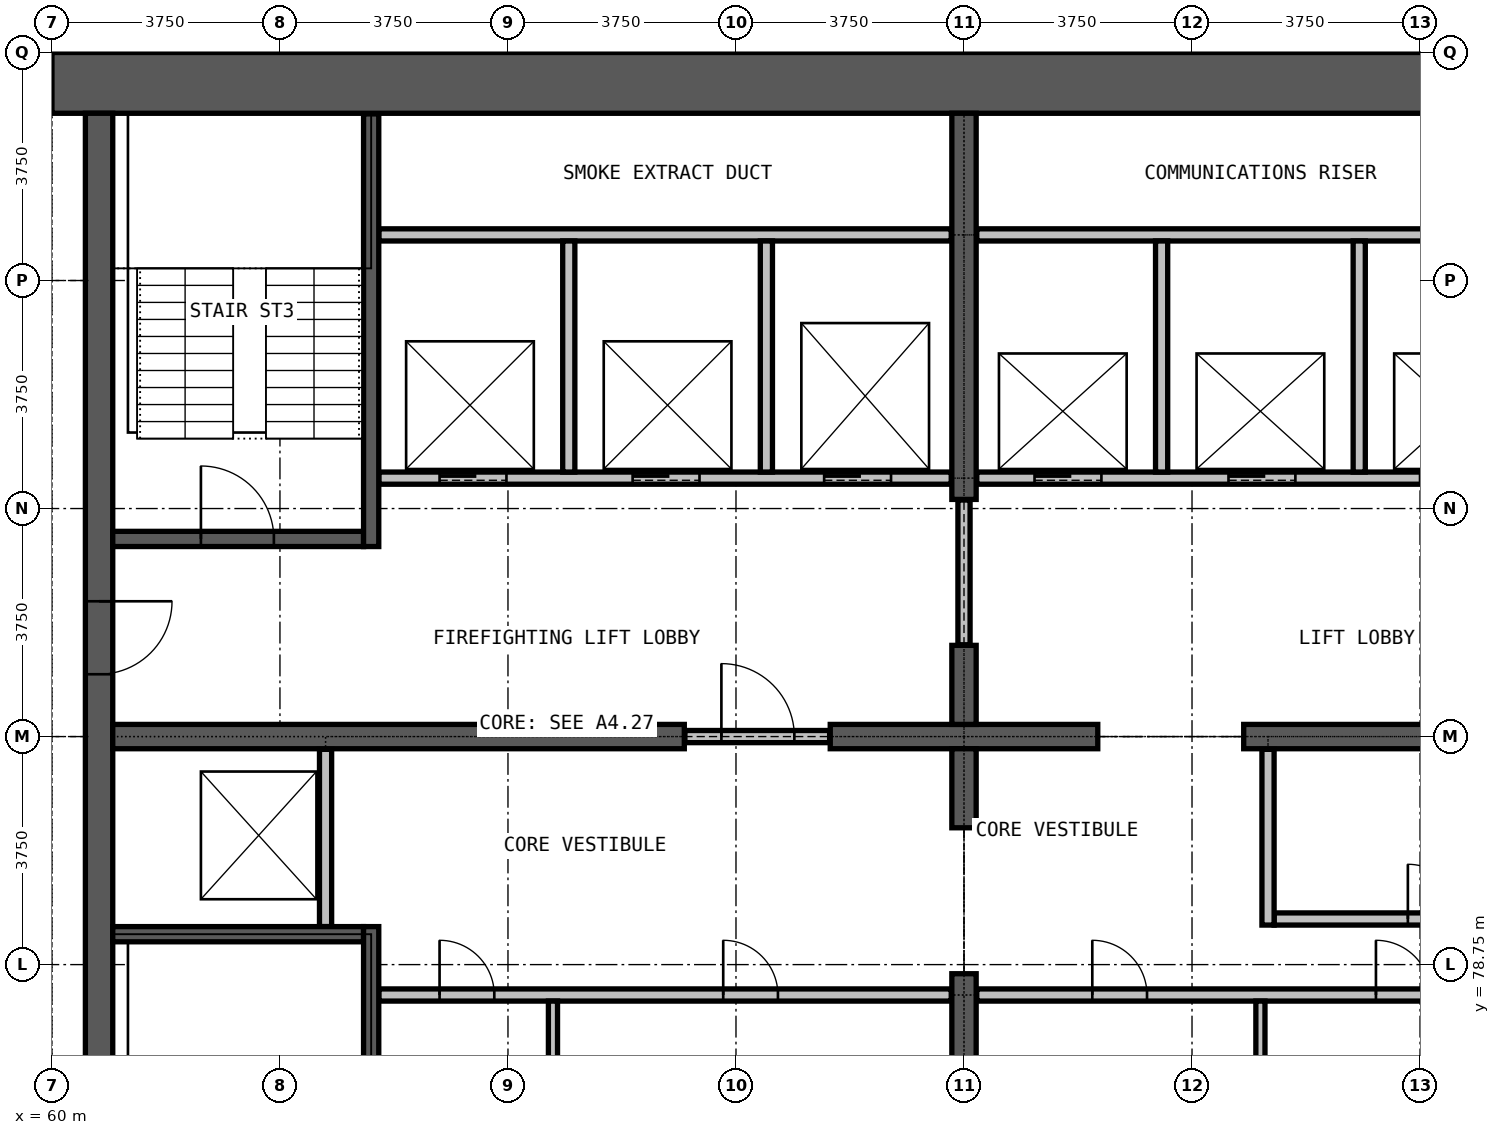
"""IFC4 building model, lengths in metres.
Left out: names, types, materials, properties, quantities, classifications, styles, units other than length and angle.
Written with IfcOpenShell. Run it as: python <this file> out.ifc"""

import sys

from ifc_helpers import new_model, si_unit, direction, frame, frame_2d, origin, place, context, subcontext, project, spatial, rectangle, extrude, element, fill, save


model = new_model("IFC4")
c1 = context("Model", 3, precision=1e-05, world=origin(), true_north=direction((0.0, 1.0)))
c2 = subcontext(c1, "Body", "Model", "MODEL_VIEW")
j1 = project(units=[si_unit("LENGTHUNIT", "METRE"), si_unit("PLANEANGLEUNIT", "RADIAN")], contexts=[c1])
p1 = place(None, origin())
s1 = spatial("IfcSite", under=j1, at=p1, CompositionType="ELEMENT")
p2 = place(p1, origin())
s2 = spatial("IfcBuilding", under=s1, at=p2, CompositionType="ELEMENT")
p3 = place(p2, frame((0.0, 0.0, 265.7)))
s3 = spatial("IfcBuildingStorey", under=s2, at=p3, CompositionType="ELEMENT", Elevation=265.7)
p4 = place(p3, frame((90.0, 93.25, 0.0), z_axis=(0.0, 0.0, 1.0), x_axis=(-1.0, 0.0, 0.0)))
e1 = element("IfcWall", 1, at=p4, inside=s3, PredefinedType="SHEAR", context=c2, shape_type="SweptSolid", body=[
    extrude(rectangle(XDim=30.0, YDim=1.0, at=frame_2d((15.0, 0.0))), origin(), (0.0, 0.0, 1.0), 3.6),
])
p5 = place(p3, frame((60.775, 92.75, 0.0), z_axis=(0.0, 0.0, 1.0), x_axis=(0.0, -1.0, 0.0)))
e2 = element("IfcWall", 2, at=p5, inside=s3, PredefinedType="SHEAR", context=c2, shape_type="SweptSolid", body=[
    extrude(rectangle(XDim=20.5, YDim=0.45, at=frame_2d((10.25, 0.0))), origin(), (0.0, 0.0, 1.0), 3.6),
])
p6 = place(p5, frame((19.025, 0.0, 0.0)))
e3 = element("IfcOpeningElement", 3, at=p6, cuts=e2, PredefinedType="OPENING", context=c2, shape_type="SweptSolid", body=[
    extrude(rectangle(XDim=1.2, YDim=2.2, at=frame_2d((0.6, 1.1))), frame((0.0, 0.235, 0.0), z_axis=(0.0, -1.0, 0.0), x_axis=(1.0, 0.0, 0.0)), (0.0, 0.0, 1.0), 0.47),
])
p7 = place(p5, frame((8.025, 0.0, 0.0)))
e4 = element("IfcOpeningElement", 4, at=p7, cuts=e2, PredefinedType="OPENING", context=c2, shape_type="SweptSolid", body=[
    extrude(rectangle(XDim=1.2, YDim=2.2, at=frame_2d((0.6, 1.1))), frame((0.0, 0.235, 0.0), z_axis=(0.0, -1.0, 0.0), x_axis=(1.0, 0.0, 0.0)), (0.0, 0.0, 1.0), 0.47),
])
p8 = place(p3, frame((61.0, 82.5, 0.0), z_axis=(0.0, 0.0, 1.0), x_axis=(1.0, 0.0, 0.0)))
e5 = element("IfcWall", 5, at=p8, inside=s3, PredefinedType="SHEAR", context=c2, shape_type="SweptSolid", body=[
    extrude(rectangle(XDim=9.4, YDim=0.4, at=frame_2d((4.7, 0.0))), origin(), (0.0, 0.0, 1.0), 3.6),
])
p9 = place(p3, frame((72.8, 82.5, 0.0), z_axis=(0.0, 0.0, 1.0), x_axis=(1.0, 0.0, 0.0)))
e6 = element("IfcWall", 6, at=p9, inside=s3, PredefinedType="SHEAR", context=c2, shape_type="SweptSolid", body=[
    extrude(rectangle(XDim=4.4, YDim=0.4, at=frame_2d((2.2, 0.0))), origin(), (0.0, 0.0, 1.0), 3.6),
])
p10 = place(p3, frame((79.6, 82.5, 0.0), z_axis=(0.0, 0.0, 1.0), x_axis=(1.0, 0.0, 0.0)))
e7 = element("IfcWall", 7, at=p10, inside=s3, PredefinedType="SHEAR", context=c2, shape_type="SweptSolid", body=[
    extrude(rectangle(XDim=9.4, YDim=0.4, at=frame_2d((4.7, 0.0))), origin(), (0.0, 0.0, 1.0), 3.6),
])
p11 = place(p3, frame((75.0, 72.25, 0.0), z_axis=(0.0, 0.0, 1.0), x_axis=(0.0, 1.0, 0.0)))
e8 = element("IfcWall", 8, at=p11, inside=s3, PredefinedType="SHEAR", context=c2, shape_type="SweptSolid", body=[
    extrude(rectangle(XDim=6.35, YDim=0.4, at=frame_2d((3.175, 0.0))), origin(), (0.0, 0.0, 1.0), 3.6),
])
for number, where, z_axis, x_axis in (
    (9, (75.0, 81.0, 0.0), (0.0, 0.0, 1.0), (0.0, 1.0, 0.0)),
    (10, (75.0, 82.7, 0.0), (0.0, 0.0, 1.0), (0.0, 1.0, 0.0)),
):
    element("IfcWall", number, at=place(p3, frame(where, z_axis=z_axis, x_axis=x_axis)), inside=s3, PredefinedType="SHEAR", context=c2, shape_type="SweptSolid", body=[
        extrude(rectangle(XDim=1.3, YDim=0.4, at=frame_2d((0.65, 0.0))), origin(), (0.0, 0.0, 1.0), 3.6),
    ])
p12 = place(p3, frame((75.0, 86.4, 0.0), z_axis=(0.0, 0.0, 1.0), x_axis=(0.0, 1.0, 0.0)))
e11 = element("IfcWall", 11, at=p12, inside=s3, PredefinedType="SHEAR", context=c2, shape_type="SweptSolid", body=[
    extrude(rectangle(XDim=6.35, YDim=0.4, at=frame_2d((3.175, 0.0))), origin(), (0.0, 0.0, 1.0), 3.6),
])
p13 = place(p3, frame((65.375, 78.25, 0.0), z_axis=(0.0, 0.0, 1.0), x_axis=(1.0, 0.0, 0.0)))
e12 = element("IfcWall", 12, at=p13, inside=s3, PredefinedType="PARTITIONING", context=c2, shape_type="SweptSolid", body=[
    extrude(rectangle(XDim=9.415, YDim=0.2, at=frame_2d((4.708, 0.0))), origin(), (0.0, 0.0, 1.0), 3.3),
])
p14 = place(p13, frame((1.0, 0.0, 0.0)))
e13 = element("IfcOpeningElement", 13, at=p14, cuts=e12, PredefinedType="OPENING", context=c2, shape_type="SweptSolid", body=[
    extrude(rectangle(XDim=0.9, YDim=2.2, at=frame_2d((0.45, 1.1))), frame((0.0, 0.11, 0.0), z_axis=(0.0, -1.0, 0.0), x_axis=(1.0, 0.0, 0.0)), (0.0, 0.0, 1.0), 0.22),
])
p15 = place(p13, frame((5.665, 0.0, 0.0)))
e14 = element("IfcOpeningElement", 14, at=p15, cuts=e12, PredefinedType="OPENING", context=c2, shape_type="SweptSolid", body=[
    extrude(rectangle(XDim=0.9, YDim=2.2, at=frame_2d((0.45, 1.1))), frame((0.0, 0.11, 0.0), z_axis=(0.0, -1.0, 0.0), x_axis=(1.0, 0.0, 0.0)), (0.0, 0.0, 1.0), 0.22),
])
p16 = place(p3, frame((75.21, 78.25, 0.0), z_axis=(0.0, 0.0, 1.0), x_axis=(1.0, 0.0, 0.0)))
e15 = element("IfcWall", 15, at=p16, inside=s3, PredefinedType="PARTITIONING", context=c2, shape_type="SweptSolid", body=[
    extrude(rectangle(XDim=9.415, YDim=0.2, at=frame_2d((4.708, 0.0))), origin(), (0.0, 0.0, 1.0), 3.3),
])
p17 = place(p16, frame((1.9, 0.0, 0.0)))
e16 = element("IfcOpeningElement", 16, at=p17, cuts=e15, PredefinedType="OPENING", context=c2, shape_type="SweptSolid", body=[
    extrude(rectangle(XDim=0.9, YDim=2.2, at=frame_2d((0.45, 1.1))), frame((0.0, 0.11, 0.0), z_axis=(0.0, -1.0, 0.0), x_axis=(1.0, 0.0, 0.0)), (0.0, 0.0, 1.0), 0.22),
])
p18 = place(p16, frame((6.565, 0.0, 0.0)))
e17 = element("IfcOpeningElement", 17, at=p18, cuts=e15, PredefinedType="OPENING", context=c2, shape_type="SweptSolid", body=[
    extrude(rectangle(XDim=0.9, YDim=2.2, at=frame_2d((0.45, 1.1))), frame((0.0, 0.11, 0.0), z_axis=(0.0, -1.0, 0.0), x_axis=(1.0, 0.0, 0.0)), (0.0, 0.0, 1.0), 0.22),
])
p19 = place(p3, frame((80.1, 79.5, 0.0), z_axis=(0.0, 0.0, 1.0), x_axis=(1.0, 0.0, 0.0)))
e18 = element("IfcWall", 18, at=p19, inside=s3, PredefinedType="PARTITIONING", context=c2, shape_type="SweptSolid", body=[
    extrude(rectangle(XDim=5.3, YDim=0.2, at=frame_2d((2.65, 0.0))), origin(), (0.0, 0.0, 1.0), 3.3),
])
p20 = place(p19, frame((2.2, 0.0, 0.0)))
e19 = element("IfcOpeningElement", 19, at=p20, cuts=e18, PredefinedType="OPENING", context=c2, shape_type="SweptSolid", body=[
    extrude(rectangle(XDim=0.9, YDim=2.2, at=frame_2d((0.45, 1.1))), frame((0.0, 0.11, 0.0), z_axis=(0.0, -1.0, 0.0), x_axis=(1.0, 0.0, 0.0)), (0.0, 0.0, 1.0), 0.22),
])
p21 = place(p3, frame((70.41, 82.5, 0.0), z_axis=(0.0, 0.0, 1.0), x_axis=(1.0, 0.0, 0.0)))
e20 = element("IfcWall", 20, at=p21, inside=s3, PredefinedType="PARTITIONING", context=c2, shape_type="SweptSolid", body=[
    extrude(rectangle(XDim=2.38, YDim=0.2, at=frame_2d((1.19, 0.0))), origin(), (0.0, 0.0, 1.0), 2.4),
])
p22 = place(p21, frame((0.6, 0.0, 0.0)))
e21 = element("IfcOpeningElement", 21, at=p22, cuts=e20, PredefinedType="OPENING", context=c2, shape_type="SweptSolid", body=[
    extrude(rectangle(XDim=1.2, YDim=2.2, at=frame_2d((0.6, 1.1))), frame((0.0, 0.11, 0.0), z_axis=(0.0, -1.0, 0.0), x_axis=(1.0, 0.0, 0.0)), (0.0, 0.0, 1.0), 0.22),
])
p23 = place(p3, frame((75.0, 84.01, 0.0), z_axis=(0.0, 0.0, 1.0), x_axis=(0.0, 1.0, 0.0)))
e22 = element("IfcWall", 22, at=p23, inside=s3, PredefinedType="PARTITIONING", context=c2, shape_type="SweptSolid", body=[
    extrude(rectangle(XDim=2.38, YDim=0.2, at=frame_2d((1.19, 0.0))), origin(), (0.0, 0.0, 1.0), 2.4),
])
p24 = place(p3, frame((80.0, 79.4, 0.0), z_axis=(0.0, 0.0, 1.0), x_axis=(0.0, 1.0, 0.0)))
e23 = element("IfcWall", 23, at=p24, inside=s3, PredefinedType="PARTITIONING", context=c2, shape_type="SweptSolid", body=[
    extrude(rectangle(XDim=2.89, YDim=0.2, at=frame_2d((1.445, 0.0))), origin(), (0.0, 0.0, 1.0), 3.3),
])
for number, where, z_axis, x_axis in (
    (24, (68.24, 74.35, 0.0), (0.0, 0.0, 1.0), (0.0, 1.0, 0.0)),
    (25, (79.875, 74.35, 0.0), (0.0, 0.0, 1.0), (0.0, 1.0, 0.0)),
):
    element("IfcWall", number, at=place(p3, frame(where, z_axis=z_axis, x_axis=x_axis)), inside=s3, PredefinedType="PARTITIONING", context=c2, shape_type="SweptSolid", body=[
        extrude(rectangle(XDim=3.8, YDim=0.15, at=frame_2d((1.9, 0.0))), origin(), (0.0, 0.0, 1.0), 3.3),
    ])
p25 = place(p3, frame((65.375, 86.75, 0.0), z_axis=(0.0, 0.0, 1.0), x_axis=(1.0, 0.0, 0.0)))
e26 = element("IfcWall", 26, at=p25, inside=s3, PredefinedType="PARTITIONING", context=c2, shape_type="SweptSolid", body=[
    extrude(rectangle(XDim=9.415, YDim=0.2, at=frame_2d((4.708, 0.0))), origin(), (0.0, 0.0, 1.0), 3.3),
])
p26 = place(p25, frame((1.0, 0.0, 0.0)))
e27 = element("IfcOpeningElement", 27, at=p26, cuts=e26, PredefinedType="OPENING", context=c2, shape_type="SweptSolid", body=[
    extrude(rectangle(XDim=1.1, YDim=2.2, at=frame_2d((0.55, 1.1))), frame((0.0, 0.11, 0.0), z_axis=(0.0, -1.0, 0.0), x_axis=(1.0, 0.0, 0.0)), (0.0, 0.0, 1.0), 0.22),
])
p27 = place(p25, frame((4.175, 0.0, 0.0)))
e28 = element("IfcOpeningElement", 28, at=p27, cuts=e26, PredefinedType="OPENING", context=c2, shape_type="SweptSolid", body=[
    extrude(rectangle(XDim=1.1, YDim=2.2, at=frame_2d((0.55, 1.1))), frame((0.0, 0.11, 0.0), z_axis=(0.0, -1.0, 0.0), x_axis=(1.0, 0.0, 0.0)), (0.0, 0.0, 1.0), 0.22),
])
p28 = place(p25, frame((7.325, 0.0, 0.0)))
e29 = element("IfcOpeningElement", 29, at=p28, cuts=e26, PredefinedType="OPENING", context=c2, shape_type="SweptSolid", body=[
    extrude(rectangle(XDim=1.1, YDim=2.2, at=frame_2d((0.55, 1.1))), frame((0.0, 0.11, 0.0), z_axis=(0.0, -1.0, 0.0), x_axis=(1.0, 0.0, 0.0)), (0.0, 0.0, 1.0), 0.22),
])
p29 = place(p3, frame((75.21, 86.75, 0.0), z_axis=(0.0, 0.0, 1.0), x_axis=(1.0, 0.0, 0.0)))
e30 = element("IfcWall", 30, at=p29, inside=s3, PredefinedType="PARTITIONING", context=c2, shape_type="SweptSolid", body=[
    extrude(rectangle(XDim=9.415, YDim=0.2, at=frame_2d((4.708, 0.0))), origin(), (0.0, 0.0, 1.0), 3.3),
])
p30 = place(p29, frame((0.95, 0.0, 0.0)))
e31 = element("IfcOpeningElement", 31, at=p30, cuts=e30, PredefinedType="OPENING", context=c2, shape_type="SweptSolid", body=[
    extrude(rectangle(XDim=1.1, YDim=2.2, at=frame_2d((0.55, 1.1))), frame((0.0, 0.11, 0.0), z_axis=(0.0, -1.0, 0.0), x_axis=(1.0, 0.0, 0.0)), (0.0, 0.0, 1.0), 0.22),
])
p31 = place(p29, frame((4.14, 0.0, 0.0)))
e32 = element("IfcOpeningElement", 32, at=p31, cuts=e30, PredefinedType="OPENING", context=c2, shape_type="SweptSolid", body=[
    extrude(rectangle(XDim=1.1, YDim=2.2, at=frame_2d((0.55, 1.1))), frame((0.0, 0.11, 0.0), z_axis=(0.0, -1.0, 0.0), x_axis=(1.0, 0.0, 0.0)), (0.0, 0.0, 1.0), 0.22),
])
p32 = place(p29, frame((7.29, 0.0, 0.0)))
e33 = element("IfcOpeningElement", 33, at=p32, cuts=e30, PredefinedType="OPENING", context=c2, shape_type="SweptSolid", body=[
    extrude(rectangle(XDim=1.1, YDim=2.2, at=frame_2d((0.55, 1.1))), frame((0.0, 0.11, 0.0), z_axis=(0.0, -1.0, 0.0), x_axis=(1.0, 0.0, 0.0)), (0.0, 0.0, 1.0), 0.22),
])
for number, where, z_axis, x_axis in (
    (34, (65.375, 90.75, 0.0), (0.0, 0.0, 1.0), (1.0, 0.0, 0.0)),
    (35, (75.21, 90.75, 0.0), (0.0, 0.0, 1.0), (1.0, 0.0, 0.0)),
):
    element("IfcWall", number, at=place(p3, frame(where, z_axis=z_axis, x_axis=x_axis)), inside=s3, PredefinedType="PARTITIONING", context=c2, shape_type="SweptSolid", body=[
        extrude(rectangle(XDim=9.415, YDim=0.2, at=frame_2d((4.708, 0.0))), origin(), (0.0, 0.0, 1.0), 3.3),
    ])
p33 = place(p3, frame((64.5, 79.375, 0.0), z_axis=(0.0, 0.0, 1.0), x_axis=(0.0, 1.0, 0.0)))
e36 = element("IfcWall", 36, at=p33, inside=s3, PredefinedType="PARTITIONING", context=c2, shape_type="SweptSolid", body=[
    extrude(rectangle(XDim=2.915, YDim=0.2, at=frame_2d((1.458, 0.0))), origin(), (0.0, 0.0, 1.0), 3.3),
])
for number, where, z_axis, x_axis in (
    (37, (68.5, 86.85, 0.0), (0.0, 0.0, 1.0), (0.0, 1.0, 0.0)),
    (38, (71.75, 86.85, 0.0), (0.0, 0.0, 1.0), (0.0, 1.0, 0.0)),
    (39, (78.25, 86.85, 0.0), (0.0, 0.0, 1.0), (0.0, 1.0, 0.0)),
    (40, (81.5, 86.85, 0.0), (0.0, 0.0, 1.0), (0.0, 1.0, 0.0)),
):
    element("IfcWall", number, at=place(p3, frame(where, z_axis=z_axis, x_axis=x_axis)), inside=s3, PredefinedType="PARTITIONING", context=c2, shape_type="SweptSolid", body=[
        extrude(rectangle(XDim=3.8, YDim=0.2, at=frame_2d((1.9, 0.0))), origin(), (0.0, 0.0, 1.0), 3.3),
    ])
p34 = place(p3, frame((61.0, 79.25, 0.0), z_axis=(0.0, 0.0, 1.0), x_axis=(1.0, 0.0, 0.0)))
e41 = element("IfcWall", 41, at=p34, inside=s3, PredefinedType="PARTITIONING", context=c2, shape_type="SweptSolid", body=[
    extrude(rectangle(XDim=4.125, YDim=0.25, at=frame_2d((2.062, 0.0))), origin(), (0.0, 0.0, 1.0), 3.3),
])
p35 = place(p3, frame((61.0, 85.75, 0.0), z_axis=(0.0, 0.0, 1.0), x_axis=(1.0, 0.0, 0.0)))
e42 = element("IfcWall", 42, at=p35, inside=s3, PredefinedType="PARTITIONING", context=c2, shape_type="SweptSolid", body=[
    extrude(rectangle(XDim=4.125, YDim=0.25, at=frame_2d((2.062, 0.0))), origin(), (0.0, 0.0, 1.0), 3.3),
])
p36 = place(p35, frame((1.45, 0.0, 0.0)))
e43 = element("IfcOpeningElement", 43, at=p36, cuts=e42, PredefinedType="OPENING", context=c2, shape_type="SweptSolid", body=[
    extrude(rectangle(XDim=1.2, YDim=2.2, at=frame_2d((0.6, 1.1))), frame((0.0, 0.135, 0.0), z_axis=(0.0, -1.0, 0.0), x_axis=(1.0, 0.0, 0.0)), (0.0, 0.0, 1.0), 0.27),
])
for number, where, z_axis, x_axis in (
    (44, (65.25, 72.26, 0.0), (0.0, 0.0, 1.0), (0.0, 1.0, 0.0)),
    (45, (65.25, 85.625, 0.0), (0.0, 0.0, 1.0), (0.0, 1.0, 0.0)),
):
    element("IfcWall", number, at=place(p3, frame(where, z_axis=z_axis, x_axis=x_axis)), inside=s3, PredefinedType="PARTITIONING", context=c2, shape_type="SweptSolid", body=[
        extrude(rectangle(XDim=7.115, YDim=0.25, at=frame_2d((3.558, 0.0))), origin(), (0.0, 0.0, 1.0), 3.3),
    ])
p37 = place(p30, origin())
e46 = element("IfcDoor", 46, at=p37, inside=s3, OperationType="DOUBLE_DOOR_SLIDING", PredefinedType="DOOR", context=c2, shape_type="SweptSolid", body=[
    extrude(rectangle(XDim=1.1, YDim=2.2, at=frame_2d((0.55, 1.1))), frame((0.0, 0.025, 0.0), z_axis=(0.0, -1.0, 0.0), x_axis=(1.0, 0.0, 0.0)), (0.0, 0.0, 1.0), 0.05),
])
fill(e31, e46)
p38 = place(p31, origin())
e47 = element("IfcDoor", 47, at=p38, inside=s3, OperationType="DOUBLE_DOOR_SLIDING", PredefinedType="DOOR", context=c2, shape_type="SweptSolid", body=[
    extrude(rectangle(XDim=1.1, YDim=2.2, at=frame_2d((0.55, 1.1))), frame((0.0, 0.025, 0.0), z_axis=(0.0, -1.0, 0.0), x_axis=(1.0, 0.0, 0.0)), (0.0, 0.0, 1.0), 0.05),
])
fill(e32, e47)
p39 = place(p26, origin())
e48 = element("IfcDoor", 48, at=p39, inside=s3, OperationType="DOUBLE_DOOR_SLIDING", PredefinedType="DOOR", context=c2, shape_type="SweptSolid", body=[
    extrude(rectangle(XDim=1.1, YDim=2.2, at=frame_2d((0.55, 1.1))), frame((0.0, 0.025, 0.0), z_axis=(0.0, -1.0, 0.0), x_axis=(1.0, 0.0, 0.0)), (0.0, 0.0, 1.0), 0.05),
])
fill(e27, e48)
p40 = place(p27, origin())
e49 = element("IfcDoor", 49, at=p40, inside=s3, OperationType="DOUBLE_DOOR_SLIDING", PredefinedType="DOOR", context=c2, shape_type="SweptSolid", body=[
    extrude(rectangle(XDim=1.1, YDim=2.2, at=frame_2d((0.55, 1.1))), frame((0.0, 0.025, 0.0), z_axis=(0.0, -1.0, 0.0), x_axis=(1.0, 0.0, 0.0)), (0.0, 0.0, 1.0), 0.05),
])
fill(e28, e49)
p41 = place(p28, origin())
e50 = element("IfcDoor", 50, at=p41, inside=s3, OperationType="DOUBLE_DOOR_SLIDING", PredefinedType="DOOR", context=c2, shape_type="SweptSolid", body=[
    extrude(rectangle(XDim=1.1, YDim=2.2, at=frame_2d((0.55, 1.1))), frame((0.0, 0.025, 0.0), z_axis=(0.0, -1.0, 0.0), x_axis=(1.0, 0.0, 0.0)), (0.0, 0.0, 1.0), 0.05),
])
fill(e29, e50)
p42 = place(p22, origin())
e51 = element("IfcDoor", 51, at=p42, inside=s3, OperationType="SINGLE_SWING_RIGHT", PredefinedType="DOOR", context=c2, shape_type="SweptSolid", body=[
    extrude(rectangle(XDim=1.2, YDim=2.2, at=frame_2d((0.6, 1.1))), frame((0.0, 0.025, 0.0), z_axis=(0.0, -1.0, 0.0), x_axis=(1.0, 0.0, 0.0)), (0.0, 0.0, 1.0), 0.05),
])
fill(e21, e51)
p43 = place(p36, origin())
e52 = element("IfcDoor", 52, at=p43, inside=s3, OperationType="SINGLE_SWING_RIGHT", PredefinedType="DOOR", context=c2, shape_type="SweptSolid", body=[
    extrude(rectangle(XDim=1.2, YDim=2.2, at=frame_2d((0.6, 1.1))), frame((0.0, 0.025, 0.0), z_axis=(0.0, -1.0, 0.0), x_axis=(1.0, 0.0, 0.0)), (0.0, 0.0, 1.0), 0.05),
])
fill(e43, e52)
p44 = place(p20, origin())
e53 = element("IfcDoor", 53, at=p44, inside=s3, OperationType="SINGLE_SWING_RIGHT", PredefinedType="DOOR", context=c2, shape_type="SweptSolid", body=[
    extrude(rectangle(XDim=0.9, YDim=2.2, at=frame_2d((0.45, 1.1))), frame((0.0, 0.025, 0.0), z_axis=(0.0, -1.0, 0.0), x_axis=(1.0, 0.0, 0.0)), (0.0, 0.0, 1.0), 0.05),
])
fill(e19, e53)
p45 = place(p7, origin())
e54 = element("IfcDoor", 54, at=p45, inside=s3, OperationType="SINGLE_SWING_LEFT", PredefinedType="DOOR", context=c2, shape_type="SweptSolid", body=[
    extrude(rectangle(XDim=1.2, YDim=2.2, at=frame_2d((0.6, 1.1))), frame((0.0, 0.025, 0.0), z_axis=(0.0, -1.0, 0.0), x_axis=(1.0, 0.0, 0.0)), (0.0, 0.0, 1.0), 0.05),
])
fill(e4, e54)
p46 = place(p14, origin())
e55 = element("IfcDoor", 55, at=p46, inside=s3, OperationType="SINGLE_SWING_LEFT", PredefinedType="DOOR", context=c2, shape_type="SweptSolid", body=[
    extrude(rectangle(XDim=0.9, YDim=2.2, at=frame_2d((0.45, 1.1))), frame((0.0, 0.025, 0.0), z_axis=(0.0, -1.0, 0.0), x_axis=(1.0, 0.0, 0.0)), (0.0, 0.0, 1.0), 0.05),
])
fill(e13, e55)
p47 = place(p15, origin())
e56 = element("IfcDoor", 56, at=p47, inside=s3, OperationType="SINGLE_SWING_LEFT", PredefinedType="DOOR", context=c2, shape_type="SweptSolid", body=[
    extrude(rectangle(XDim=0.9, YDim=2.2, at=frame_2d((0.45, 1.1))), frame((0.0, 0.025, 0.0), z_axis=(0.0, -1.0, 0.0), x_axis=(1.0, 0.0, 0.0)), (0.0, 0.0, 1.0), 0.05),
])
fill(e14, e56)
p48 = place(p17, origin())
e57 = element("IfcDoor", 57, at=p48, inside=s3, OperationType="SINGLE_SWING_LEFT", PredefinedType="DOOR", context=c2, shape_type="SweptSolid", body=[
    extrude(rectangle(XDim=0.9, YDim=2.2, at=frame_2d((0.45, 1.1))), frame((0.0, 0.025, 0.0), z_axis=(0.0, -1.0, 0.0), x_axis=(1.0, 0.0, 0.0)), (0.0, 0.0, 1.0), 0.05),
])
fill(e16, e57)
p49 = place(p18, origin())
e58 = element("IfcDoor", 58, at=p49, inside=s3, OperationType="SINGLE_SWING_LEFT", PredefinedType="DOOR", context=c2, shape_type="SweptSolid", body=[
    extrude(rectangle(XDim=0.9, YDim=2.2, at=frame_2d((0.45, 1.1))), frame((0.0, 0.025, 0.0), z_axis=(0.0, -1.0, 0.0), x_axis=(1.0, 0.0, 0.0)), (0.0, 0.0, 1.0), 0.05),
])
fill(e17, e58)
save(model, sys.argv[1])
